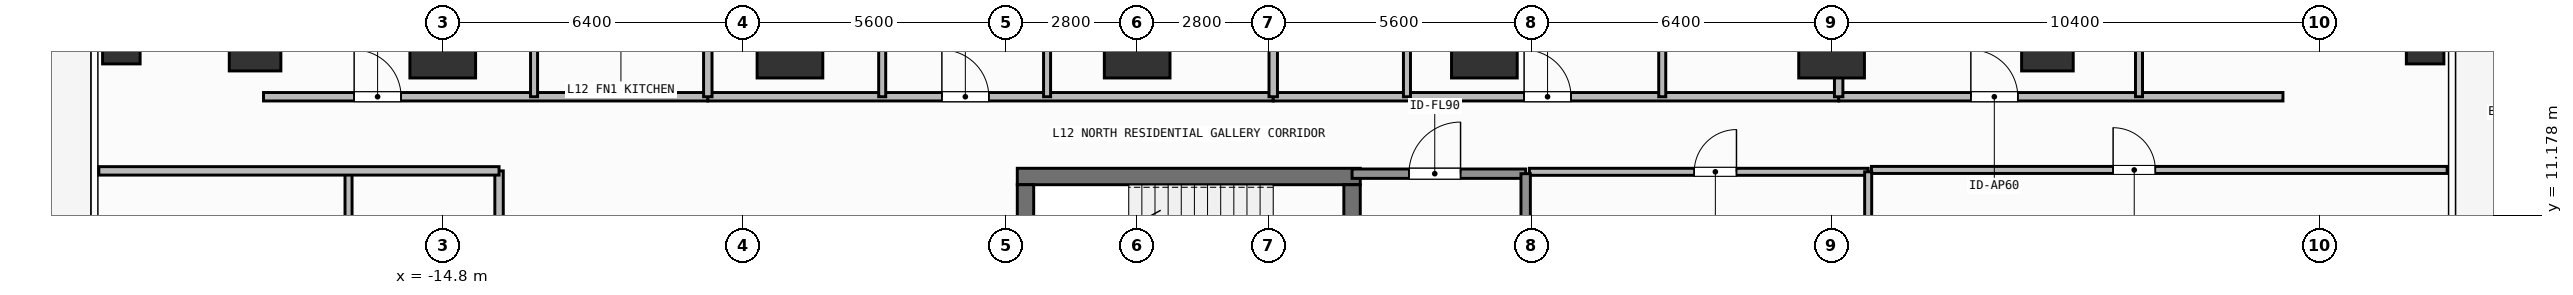
"""IFC4 building model, lengths in metres.
Left out: names, types, materials, properties, quantities, classifications, styles, units other than length and angle.
Written with IfcOpenShell. Run it as: python <this file> out.ifc"""

import sys

from ifc_helpers import new_model, si_unit, direction, frame, frame_2d, origin, origin_2d, place, context, subcontext, project, spatial, rectangle, hollow_rectangle, extrude, element, fill, save


model = new_model("IFC4")
c1 = context("Model", 3, precision=1e-05, world=origin(), true_north=direction((0.0, 1.0)))
c2 = subcontext(c1, "Body", "Model", "MODEL_VIEW")
j1 = project(units=[si_unit("LENGTHUNIT", "METRE"), si_unit("PLANEANGLEUNIT", "RADIAN")], contexts=[c1])
p1 = place(None, origin())
s1 = spatial("IfcSite", under=j1, at=p1, CompositionType="ELEMENT")
p2 = place(p1, origin())
s2 = spatial("IfcBuilding", under=s1, at=p2, CompositionType="ELEMENT")
p3 = place(p2, frame((0.0, 0.0, 46.2)))
s3 = spatial("IfcBuildingStorey", under=s2, at=p3, CompositionType="ELEMENT", Elevation=46.2)
p4 = place(p3, frame((-2.555, 12.0, 0.0), z_axis=(0.0, 0.0, 1.0), x_axis=(1.0, 0.0, 0.0)))
e1 = element("IfcWall", 1, at=p4, inside=s3, PredefinedType="SHEAR", context=c2, shape_type="SweptSolid", body=[
    extrude(rectangle(XDim=7.31, YDim=0.35, at=frame_2d((3.655, 0.0))), origin(), (0.0, 0.0, 1.0), 3.9),
])
p5 = place(p3, frame((-2.38, 8.9, 0.0), z_axis=(0.0, 0.0, 1.0), x_axis=(0.0, 1.0, 0.0)))
e2 = element("IfcWall", 2, at=p5, inside=s3, PredefinedType="SHEAR", context=c2, shape_type="SweptSolid", body=[
    extrude(rectangle(XDim=2.925, YDim=0.35, at=frame_2d((1.462, 0.0))), origin(), (0.0, 0.0, 1.0), 3.9),
])
p6 = place(p3, frame((4.58, 11.825, 0.0), z_axis=(0.0, 0.0, 1.0), x_axis=(0.0, -1.0, 0.0)))
e3 = element("IfcWall", 3, at=p6, inside=s3, PredefinedType="SHEAR", context=c2, shape_type="SweptSolid", body=[
    extrude(rectangle(XDim=2.925, YDim=0.35, at=frame_2d((1.462, 0.0))), origin(), (0.0, 0.0, 1.0), 3.9),
])
p7 = place(p6, frame((0.913, 0.0, 0.0)))
e4 = element("IfcOpeningElement", 4, at=p7, cuts=e3, PredefinedType="OPENING", context=c2, shape_type="SweptSolid", body=[
    extrude(rectangle(XDim=1.1, YDim=2.15, at=frame_2d((0.55, 1.075))), frame((0.0, 0.185, 0.0), z_axis=(0.0, -1.0, 0.0), x_axis=(1.0, 0.0, 0.0)), (0.0, 0.0, 1.0), 0.37),
])
for number, where, z_axis, x_axis in (
    (5, (-14.8, 14.8, 0.0), (0.0, 0.0, 1.0), (1.0, 0.0, 0.0)),
    (6, (-7.4, 14.8, 0.0), (0.0, 0.0, 1.0), (1.0, 0.0, 0.0)),
    (7, (0.0, 14.8, 0.0), (0.0, 0.0, 1.0), (1.0, 0.0, 0.0)),
    (8, (7.4, 14.8, 0.0), (0.0, 0.0, 1.0), (1.0, 0.0, 0.0)),
    (9, (14.8, 14.8, 0.0), (0.0, 0.0, 1.0), (1.0, 0.0, 0.0)),
):
    element("IfcColumn", number, at=place(p3, frame(where, z_axis=z_axis, x_axis=x_axis)), inside=s3, PredefinedType="COLUMN", context=c2, shape_type="SweptSolid", body=[
        extrude(rectangle(XDim=1.4, YDim=1.4, at=origin_2d()), origin(), (0.0, 0.0, 1.0), 3.9),
    ])
for number, where, z_axis, x_axis in (
    (10, (-18.8, 14.8, 0.0), (0.0, 0.0, 1.0), (1.0, 0.0, 0.0)),
    (11, (19.4, 14.8, 0.0), (0.0, 0.0, 1.0), (1.0, 0.0, 0.0)),
):
    element("IfcColumn", number, at=place(p3, frame(where, z_axis=z_axis, x_axis=x_axis)), inside=s3, PredefinedType="COLUMN", context=c2, shape_type="SweptSolid", body=[
        extrude(rectangle(XDim=1.1, YDim=1.1, at=origin_2d()), origin(), (0.0, 0.0, 1.0), 3.9),
    ])
for number, where, z_axis, x_axis in (
    (12, (-21.65, 14.8, 0.0), (0.0, 0.0, 1.0), (1.0, 0.0, 0.0)),
    (13, (27.45, 14.8, 0.0), (0.0, 0.0, 1.0), (1.0, 0.0, 0.0)),
):
    element("IfcColumn", number, at=place(p3, frame(where, z_axis=z_axis, x_axis=x_axis)), inside=s3, PredefinedType="COLUMN", context=c2, shape_type="SweptSolid", body=[
        extrude(hollow_rectangle(XDim=0.8, YDim=0.8, WallThickness=0.036, at=origin_2d()), origin(), (0.0, 0.0, 1.0), 3.9),
    ])
p8 = place(p3, frame((4.58, 12.06, 0.0), z_axis=(0.0, 0.0, 1.0), x_axis=(1.0, 0.0, 0.0)))
e14 = element("IfcWall", 14, at=p8, inside=s3, PredefinedType="SOLIDWALL", context=c2, shape_type="SweptSolid", body=[
    extrude(rectangle(XDim=3.7, YDim=0.2, at=frame_2d((1.85, 0.0))), origin(), (0.0, 0.0, 1.0), 3.68),
])
p9 = place(p8, frame((1.212, 0.0, 0.0)))
e15 = element("IfcOpeningElement", 15, at=p9, cuts=e14, PredefinedType="OPENING", context=c2, shape_type="SweptSolid", body=[
    extrude(rectangle(XDim=1.1, YDim=2.15, at=frame_2d((0.55, 1.075))), frame((0.0, 0.11, 0.0), z_axis=(0.0, -1.0, 0.0), x_axis=(1.0, 0.0, 0.0)), (0.0, 0.0, 1.0), 0.22),
])
p10 = place(p3, frame((8.36, 12.1, 0.0), z_axis=(0.0, 0.0, 1.0), x_axis=(1.0, 0.0, 0.0)))
e16 = element("IfcWall", 16, at=p10, inside=s3, PredefinedType="PARTITIONING", context=c2, shape_type="SweptSolid", body=[
    extrude(rectangle(XDim=7.22, YDim=0.15, at=frame_2d((3.61, 0.0))), origin(), (0.0, 0.0, 1.0), 3.68),
])
p11 = place(p10, frame((3.513, 0.0, 0.0)))
e17 = element("IfcOpeningElement", 17, at=p11, cuts=e16, PredefinedType="OPENING", context=c2, shape_type="SweptSolid", body=[
    extrude(rectangle(XDim=0.9, YDim=2.1, at=frame_2d((0.45, 1.05))), frame((0.0, 0.085, 0.0), z_axis=(0.0, -1.0, 0.0), x_axis=(1.0, 0.0, 0.0)), (0.0, 0.0, 1.0), 0.17),
])
p12 = place(p3, frame((-18.62, 13.7, 0.0), z_axis=(0.0, 0.0, 1.0), x_axis=(1.0, 0.0, 0.0)))
e18 = element("IfcWall", 18, at=p12, inside=s3, PredefinedType="PARTITIONING", context=c2, shape_type="SweptSolid", body=[
    extrude(rectangle(XDim=9.469, YDim=0.18, at=frame_2d((4.735, 0.0))), origin(), (0.0, 0.0, 1.0), 3.68),
])
p13 = place(p12, frame((1.931, 0.0, 0.0)))
e19 = element("IfcOpeningElement", 19, at=p13, cuts=e18, PredefinedType="OPENING", context=c2, shape_type="SweptSolid", body=[
    extrude(rectangle(XDim=1.0, YDim=2.2, at=frame_2d((0.5, 1.1))), frame((0.0, 0.1, 0.0), z_axis=(0.0, -1.0, 0.0), x_axis=(1.0, 0.0, 0.0)), (0.0, 0.0, 1.0), 0.2),
])
p14 = place(p3, frame((-12.854, 13.7, 0.0), z_axis=(0.0, 0.0, 1.0), x_axis=(0.0, 1.0, 0.0)))
e20 = element("IfcWall", 20, at=p14, inside=s3, PredefinedType="PARTITIONING", context=c2, shape_type="SweptSolid", body=[
    extrude(rectangle(XDim=3.899, YDim=0.15, at=frame_2d((1.95, 0.0))), origin(), (0.0, 0.0, 1.0), 3.68),
])
p15 = place(p14, frame((1.865, 0.0, 0.0)))
e21 = element("IfcOpeningElement", 21, at=p15, cuts=e20, PredefinedType="OPENING", context=c2, shape_type="SweptSolid", body=[
    extrude(rectangle(XDim=0.85, YDim=2.1, at=frame_2d((0.425, 1.05))), frame((0.0, 0.085, 0.0), z_axis=(0.0, -1.0, 0.0), x_axis=(1.0, 0.0, 0.0)), (0.0, 0.0, 1.0), 0.17),
])
p16 = place(p3, frame((-9.151, 13.7, 0.0), z_axis=(0.0, 0.0, 1.0), x_axis=(1.0, 0.0, 0.0)))
e22 = element("IfcWall", 22, at=p16, inside=s3, PredefinedType="PARTITIONING", context=c2, shape_type="SweptSolid", body=[
    extrude(rectangle(XDim=12.051, YDim=0.18, at=frame_2d((6.025, 0.0))), origin(), (0.0, 0.0, 1.0), 3.68),
])
p17 = place(p16, frame((4.989, 0.0, 0.0)))
e23 = element("IfcOpeningElement", 23, at=p17, cuts=e22, PredefinedType="OPENING", context=c2, shape_type="SweptSolid", body=[
    extrude(rectangle(XDim=1.0, YDim=2.2, at=frame_2d((0.5, 1.1))), frame((0.0, 0.1, 0.0), z_axis=(0.0, -1.0, 0.0), x_axis=(1.0, 0.0, 0.0)), (0.0, 0.0, 1.0), 0.2),
])
p18 = place(p3, frame((-5.434, 13.7, 0.0), z_axis=(0.0, 0.0, 1.0), x_axis=(0.0, 1.0, 0.0)))
e24 = element("IfcWall", 24, at=p18, inside=s3, PredefinedType="PARTITIONING", context=c2, shape_type="SweptSolid", body=[
    extrude(rectangle(XDim=7.09, YDim=0.15, at=frame_2d((3.545, 0.0))), origin(), (0.0, 0.0, 1.0), 3.68),
])
p19 = place(p18, frame((3.03, 0.0, 0.0)))
e25 = element("IfcOpeningElement", 25, at=p19, cuts=e24, PredefinedType="OPENING", context=c2, shape_type="SweptSolid", body=[
    extrude(rectangle(XDim=0.85, YDim=2.1, at=frame_2d((0.425, 1.05))), frame((0.0, 0.085, 0.0), z_axis=(0.0, -1.0, 0.0), x_axis=(1.0, 0.0, 0.0)), (0.0, 0.0, 1.0), 0.17),
])
p20 = place(p3, frame((-1.92, 13.7, 0.0), z_axis=(0.0, 0.0, 1.0), x_axis=(0.0, 1.0, 0.0)))
e26 = element("IfcWall", 26, at=p20, inside=s3, PredefinedType="PARTITIONING", context=c2, shape_type="SweptSolid", body=[
    extrude(rectangle(XDim=4.963, YDim=0.15, at=frame_2d((2.481, 0.0))), origin(), (0.0, 0.0, 1.0), 3.68),
])
p21 = place(p20, frame((2.056, 0.0, 0.0)))
e27 = element("IfcOpeningElement", 27, at=p21, cuts=e26, PredefinedType="OPENING", context=c2, shape_type="SweptSolid", body=[
    extrude(rectangle(XDim=0.85, YDim=2.1, at=frame_2d((0.425, 1.05))), frame((0.0, 0.085, 0.0), z_axis=(0.0, -1.0, 0.0), x_axis=(1.0, 0.0, 0.0)), (0.0, 0.0, 1.0), 0.17),
])
p22 = place(p3, frame((2.9, 13.7, 0.0), z_axis=(0.0, 0.0, 1.0), x_axis=(1.0, 0.0, 0.0)))
e28 = element("IfcWall", 28, at=p22, inside=s3, PredefinedType="PARTITIONING", context=c2, shape_type="SweptSolid", body=[
    extrude(rectangle(XDim=12.051, YDim=0.18, at=frame_2d((6.025, 0.0))), origin(), (0.0, 0.0, 1.0), 3.68),
])
p23 = place(p22, frame((5.347, 0.0, 0.0)))
e29 = element("IfcOpeningElement", 29, at=p23, cuts=e28, PredefinedType="OPENING", context=c2, shape_type="SweptSolid", body=[
    extrude(rectangle(XDim=1.0, YDim=2.2, at=frame_2d((0.5, 1.1))), frame((0.0, 0.1, 0.0), z_axis=(0.0, -1.0, 0.0), x_axis=(1.0, 0.0, 0.0)), (0.0, 0.0, 1.0), 0.2),
])
p24 = place(p3, frame((5.75, 13.7, 0.0), z_axis=(0.0, 0.0, 1.0), x_axis=(0.0, 1.0, 0.0)))
e30 = element("IfcWall", 30, at=p24, inside=s3, PredefinedType="PARTITIONING", context=c2, shape_type="SweptSolid", body=[
    extrude(rectangle(XDim=7.09, YDim=0.15, at=frame_2d((3.545, 0.0))), origin(), (0.0, 0.0, 1.0), 3.68),
])
p25 = place(p24, frame((3.03, 0.0, 0.0)))
e31 = element("IfcOpeningElement", 31, at=p25, cuts=e30, PredefinedType="OPENING", context=c2, shape_type="SweptSolid", body=[
    extrude(rectangle(XDim=0.85, YDim=2.1, at=frame_2d((0.425, 1.05))), frame((0.0, 0.085, 0.0), z_axis=(0.0, -1.0, 0.0), x_axis=(1.0, 0.0, 0.0)), (0.0, 0.0, 1.0), 0.17),
])
p26 = place(p3, frame((11.191, 13.7, 0.0), z_axis=(0.0, 0.0, 1.0), x_axis=(0.0, 1.0, 0.0)))
e32 = element("IfcWall", 32, at=p26, inside=s3, PredefinedType="PARTITIONING", context=c2, shape_type="SweptSolid", body=[
    extrude(rectangle(XDim=4.857, YDim=0.15, at=frame_2d((2.428, 0.0))), origin(), (0.0, 0.0, 1.0), 3.68),
])
p27 = place(p26, frame((1.916, 0.0, 0.0)))
e33 = element("IfcOpeningElement", 33, at=p27, cuts=e32, PredefinedType="OPENING", context=c2, shape_type="SweptSolid", body=[
    extrude(rectangle(XDim=0.85, YDim=2.1, at=frame_2d((0.425, 1.05))), frame((0.0, 0.085, 0.0), z_axis=(0.0, -1.0, 0.0), x_axis=(1.0, 0.0, 0.0)), (0.0, 0.0, 1.0), 0.17),
])
p28 = place(p3, frame((14.951, 13.7, 0.0), z_axis=(0.0, 0.0, 1.0), x_axis=(1.0, 0.0, 0.0)))
e34 = element("IfcWall", 34, at=p28, inside=s3, PredefinedType="PARTITIONING", context=c2, shape_type="SweptSolid", body=[
    extrude(rectangle(XDim=9.469, YDim=0.18, at=frame_2d((4.734, 0.0))), origin(), (0.0, 0.0, 1.0), 3.68),
])
p29 = place(p28, frame((2.817, 0.0, 0.0)))
e35 = element("IfcOpeningElement", 35, at=p29, cuts=e34, PredefinedType="OPENING", context=c2, shape_type="SweptSolid", body=[
    extrude(rectangle(XDim=1.0, YDim=2.2, at=frame_2d((0.5, 1.1))), frame((0.0, 0.1, 0.0), z_axis=(0.0, -1.0, 0.0), x_axis=(1.0, 0.0, 0.0)), (0.0, 0.0, 1.0), 0.2),
])
p30 = place(p3, frame((21.352, 13.7, 0.0), z_axis=(0.0, 0.0, 1.0), x_axis=(0.0, 1.0, 0.0)))
e36 = element("IfcWall", 36, at=p30, inside=s3, PredefinedType="PARTITIONING", context=c2, shape_type="SweptSolid", body=[
    extrude(rectangle(XDim=3.899, YDim=0.15, at=frame_2d((1.95, 0.0))), origin(), (0.0, 0.0, 1.0), 3.68),
])
p31 = place(p30, frame((1.695, 0.0, 0.0)))
e37 = element("IfcOpeningElement", 37, at=p31, cuts=e36, PredefinedType="OPENING", context=c2, shape_type="SweptSolid", body=[
    extrude(rectangle(XDim=0.85, YDim=2.1, at=frame_2d((0.425, 1.05))), frame((0.0, 0.085, 0.0), z_axis=(0.0, -1.0, 0.0), x_axis=(1.0, 0.0, 0.0)), (0.0, 0.0, 1.0), 0.17),
])
p32 = place(p3, frame((-13.6, -12.12, 0.0), z_axis=(0.0, 0.0, 1.0), x_axis=(0.0, 1.0, 0.0)))
e38 = element("IfcWall", 38, at=p32, inside=s3, PredefinedType="PARTITIONING", context=c2, shape_type="SweptSolid", body=[
    extrude(rectangle(XDim=24.24, YDim=0.18, at=frame_2d((12.12, 0.0))), origin(), (0.0, 0.0, 1.0), 3.68),
])
p33 = place(p32, frame((9.829, 0.0, 0.0)))
e39 = element("IfcOpeningElement", 39, at=p33, cuts=e38, PredefinedType="OPENING", context=c2, shape_type="SweptSolid", body=[
    extrude(rectangle(XDim=1.0, YDim=2.2, at=frame_2d((0.5, 1.1))), frame((0.0, 0.1, 0.0), z_axis=(0.0, -1.0, 0.0), x_axis=(1.0, 0.0, 0.0)), (0.0, 0.0, 1.0), 0.2),
])
p34 = place(p3, frame((15.65, 12.14, 0.0), z_axis=(0.0, 0.0, 1.0), x_axis=(1.0, 0.0, 0.0)))
e40 = element("IfcWall", 40, at=p34, inside=s3, PredefinedType="PARTITIONING", context=c2, shape_type="SweptSolid", body=[
    extrude(rectangle(XDim=12.27, YDim=0.15, at=frame_2d((6.135, 0.0))), origin(), (0.0, 0.0, 1.0), 3.68),
])
p35 = place(p34, frame((5.15, 0.0, 0.0)))
e41 = element("IfcOpeningElement", 41, at=p35, cuts=e40, PredefinedType="OPENING", context=c2, shape_type="SweptSolid", body=[
    extrude(rectangle(XDim=0.9, YDim=2.1, at=frame_2d((0.45, 1.05))), frame((0.0, 0.085, 0.0), z_axis=(0.0, -1.0, 0.0), x_axis=(1.0, 0.0, 0.0)), (0.0, 0.0, 1.0), 0.17),
])
p36 = place(p3, frame((8.28, 8.95, 0.0), z_axis=(0.0, 0.0, 1.0), x_axis=(0.0, 1.0, 0.0)))
e42 = element("IfcWall", 42, at=p36, inside=s3, PredefinedType="SOLIDWALL", context=c2, shape_type="SweptSolid", body=[
    extrude(rectangle(XDim=3.11, YDim=0.2, at=frame_2d((1.555, 0.0))), origin(), (0.0, 0.0, 1.0), 3.68),
])
p37 = place(p3, frame((15.58, 5.85, 0.0), z_axis=(0.0, 0.0, 1.0), x_axis=(0.0, 1.0, 0.0)))
e43 = element("IfcWall", 43, at=p37, inside=s3, PredefinedType="PARTITIONING", context=c2, shape_type="SweptSolid", body=[
    extrude(rectangle(XDim=6.25, YDim=0.15, at=frame_2d((3.125, 0.0))), origin(), (0.0, 0.0, 1.0), 3.68),
])
for number, where, z_axis, x_axis in (
    (44, (-9.151, 13.7, 0.0), (0.0, 0.0, 1.0), (0.0, 1.0, 0.0)),
    (45, (2.9, 13.7, 0.0), (0.0, 0.0, 1.0), (0.0, 1.0, 0.0)),
):
    element("IfcWall", number, at=place(p3, frame(where, z_axis=z_axis, x_axis=x_axis)), inside=s3, PredefinedType="PARTITIONING", context=c2, shape_type="SweptSolid", body=[
        extrude(rectangle(XDim=11.33, YDim=0.18, at=frame_2d((5.665, 0.0))), origin(), (0.0, 0.0, 1.0), 3.68),
    ])
p38 = place(p3, frame((14.951, 13.7, 0.0), z_axis=(0.0, 0.0, 1.0), x_axis=(0.0, 1.0, 0.0)))
e46 = element("IfcWall", 46, at=p38, inside=s3, PredefinedType="PARTITIONING", context=c2, shape_type="SweptSolid", body=[
    extrude(rectangle(XDim=11.33, YDim=0.18, at=frame_2d((5.665, 0.0))), origin(), (0.0, 0.0, 1.0), 3.082),
])
p39 = place(p3, frame((-16.808, 5.436, 0.0), z_axis=(0.0, 0.0, 1.0), x_axis=(0.0, 1.0, 0.0)))
e47 = element("IfcWall", 47, at=p39, inside=s3, PredefinedType="PARTITIONING", context=c2, shape_type="SweptSolid", body=[
    extrude(rectangle(XDim=6.684, YDim=0.15, at=frame_2d((3.342, 0.0))), origin(), (0.0, 0.0, 1.0), 3.68),
])
p40 = place(p3, frame((-22.13, 12.12, 0.0), z_axis=(0.0, 0.0, 1.0), x_axis=(1.0, 0.0, 0.0)))
e48 = element("IfcWall", 48, at=p40, inside=s3, PredefinedType="PARTITIONING", context=c2, shape_type="SweptSolid", body=[
    extrude(rectangle(XDim=8.53, YDim=0.18, at=frame_2d((4.265, 0.0))), origin(), (0.0, 0.0, 1.0), 3.68),
])
p41 = place(p9, origin())
e49 = element("IfcDoor", 49, at=p41, inside=s3, OperationType="SINGLE_SWING_RIGHT", PredefinedType="DOOR", context=c2, shape_type="SweptSolid", body=[
    extrude(rectangle(XDim=1.1, YDim=2.15, at=frame_2d((0.55, 1.075))), frame((0.0, 0.025, 0.0), z_axis=(0.0, -1.0, 0.0), x_axis=(1.0, 0.0, 0.0)), (0.0, 0.0, 1.0), 0.05),
])
fill(e15, e49)
p42 = place(p11, origin())
e50 = element("IfcDoor", 50, at=p42, inside=s3, OperationType="SINGLE_SWING_RIGHT", PredefinedType="DOOR", context=c2, shape_type="SweptSolid", body=[
    extrude(rectangle(XDim=0.9, YDim=2.1, at=frame_2d((0.45, 1.05))), frame((0.0, 0.025, 0.0), z_axis=(0.0, -1.0, 0.0), x_axis=(1.0, 0.0, 0.0)), (0.0, 0.0, 1.0), 0.05),
])
fill(e17, e50)
p43 = place(p13, origin())
e51 = element("IfcDoor", 51, at=p43, inside=s3, OperationType="SINGLE_SWING_LEFT", PredefinedType="DOOR", context=c2, shape_type="SweptSolid", body=[
    extrude(rectangle(XDim=1.0, YDim=2.2, at=frame_2d((0.5, 1.1))), frame((0.0, 0.025, 0.0), z_axis=(0.0, -1.0, 0.0), x_axis=(1.0, 0.0, 0.0)), (0.0, 0.0, 1.0), 0.05),
])
fill(e19, e51)
p44 = place(p17, origin())
e52 = element("IfcDoor", 52, at=p44, inside=s3, OperationType="SINGLE_SWING_LEFT", PredefinedType="DOOR", context=c2, shape_type="SweptSolid", body=[
    extrude(rectangle(XDim=1.0, YDim=2.2, at=frame_2d((0.5, 1.1))), frame((0.0, 0.025, 0.0), z_axis=(0.0, -1.0, 0.0), x_axis=(1.0, 0.0, 0.0)), (0.0, 0.0, 1.0), 0.05),
])
fill(e23, e52)
p45 = place(p23, origin())
e53 = element("IfcDoor", 53, at=p45, inside=s3, OperationType="SINGLE_SWING_LEFT", PredefinedType="DOOR", context=c2, shape_type="SweptSolid", body=[
    extrude(rectangle(XDim=1.0, YDim=2.2, at=frame_2d((0.5, 1.1))), frame((0.0, 0.025, 0.0), z_axis=(0.0, -1.0, 0.0), x_axis=(1.0, 0.0, 0.0)), (0.0, 0.0, 1.0), 0.05),
])
fill(e29, e53)
p46 = place(p29, origin())
e54 = element("IfcDoor", 54, at=p46, inside=s3, OperationType="SINGLE_SWING_LEFT", PredefinedType="DOOR", context=c2, shape_type="SweptSolid", body=[
    extrude(rectangle(XDim=1.0, YDim=2.2, at=frame_2d((0.5, 1.1))), frame((0.0, 0.025, 0.0), z_axis=(0.0, -1.0, 0.0), x_axis=(1.0, 0.0, 0.0)), (0.0, 0.0, 1.0), 0.05),
])
fill(e35, e54)
p47 = place(p35, origin())
e55 = element("IfcDoor", 55, at=p47, inside=s3, OperationType="SINGLE_SWING_LEFT", PredefinedType="DOOR", context=c2, shape_type="SweptSolid", body=[
    extrude(rectangle(XDim=0.9, YDim=2.1, at=frame_2d((0.45, 1.05))), frame((0.0, 0.025, 0.0), z_axis=(0.0, -1.0, 0.0), x_axis=(1.0, 0.0, 0.0)), (0.0, 0.0, 1.0), 0.05),
])
fill(e41, e55)
save(model, sys.argv[1])
